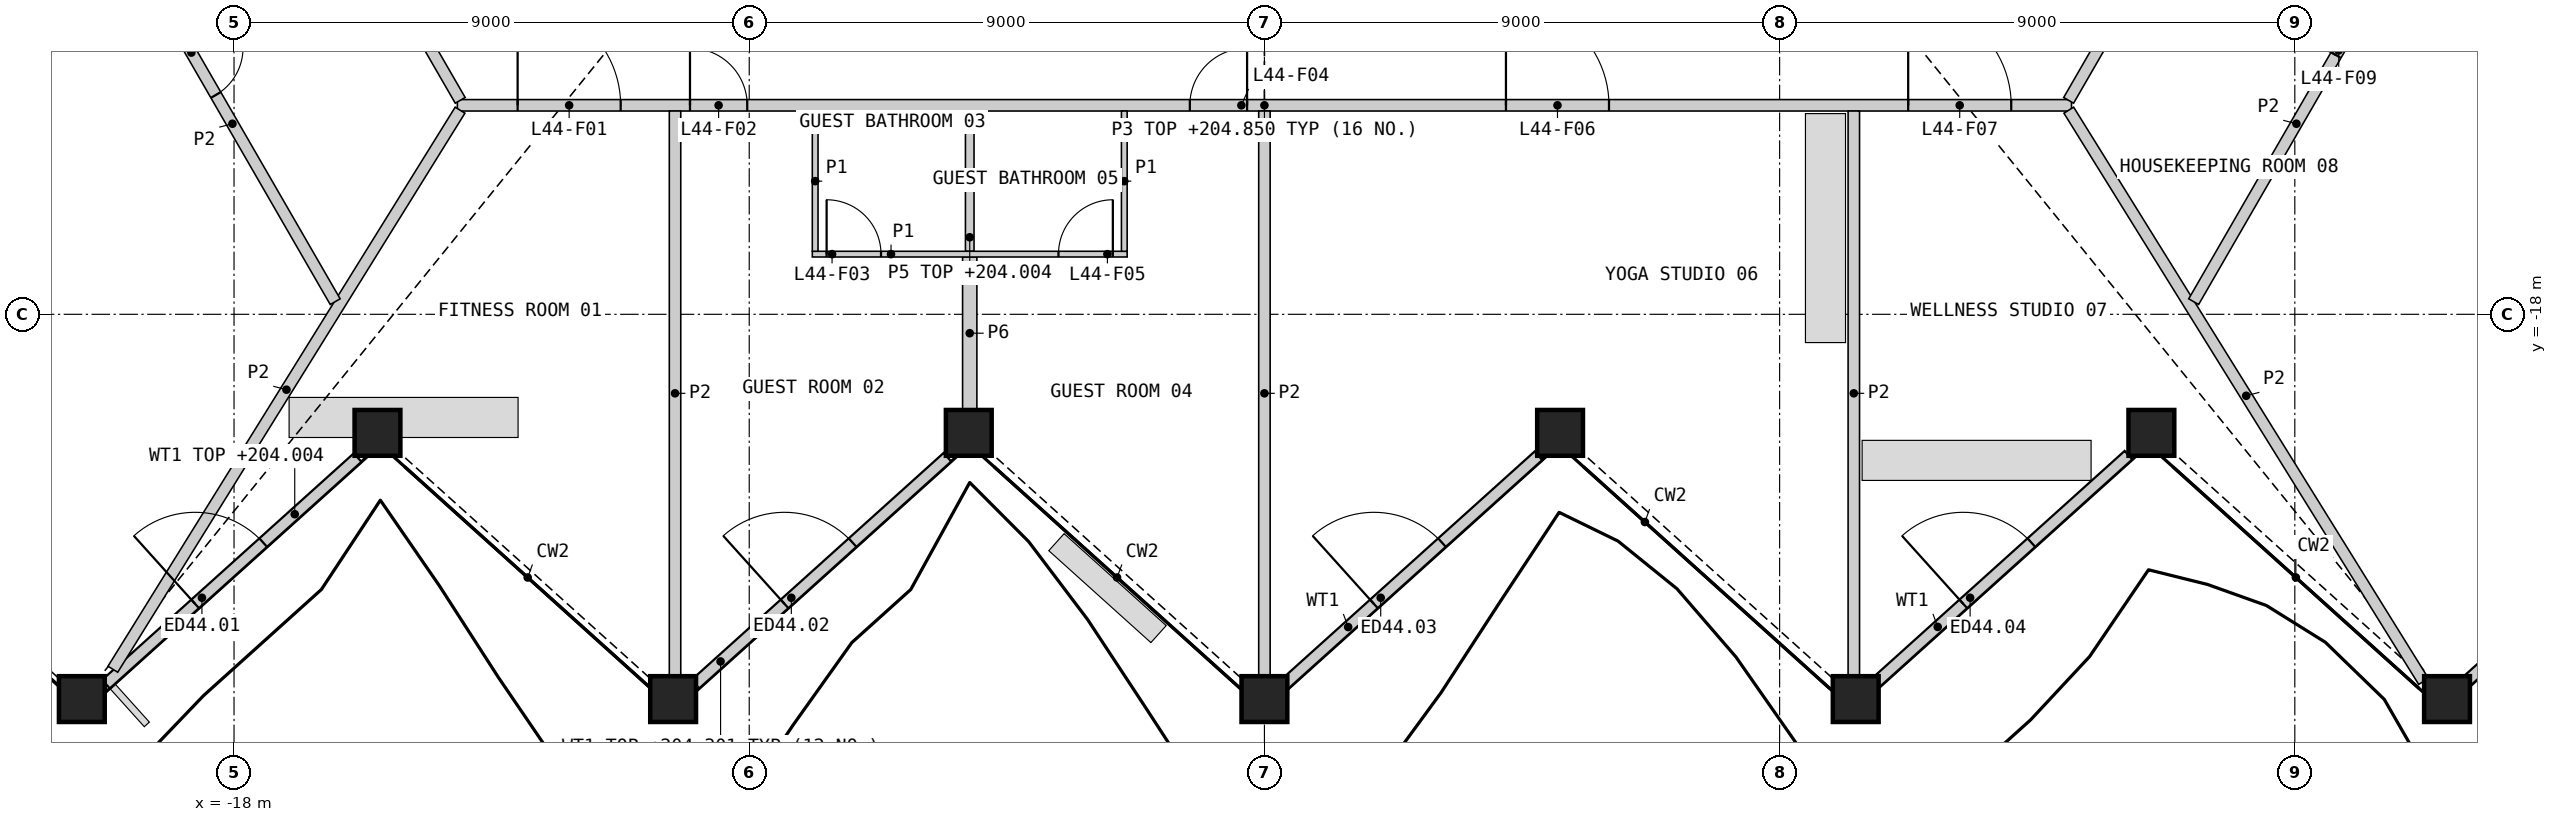
"""IFC4 building model, lengths in metres.
Left out: names, types, materials, properties, quantities, classifications, styles, units other than length and angle.
Written with IfcOpenShell. Run it as: python <this file> out.ifc"""

import sys

from ifc_helpers import new_model, si_unit, direction, frame, frame_2d, origin, origin_2d, place, context, subcontext, project, spatial, rectangle, hollow_rectangle, extrude, element, fill, save


model = new_model("IFC4")
c1 = context("Model", 3, precision=1e-05, world=origin(), true_north=direction((0.0, 1.0)))
c2 = subcontext(c1, "Body", "Model", "MODEL_VIEW")
j1 = project(units=[si_unit("LENGTHUNIT", "METRE"), si_unit("PLANEANGLEUNIT", "RADIAN")], contexts=[c1])
p1 = place(None, origin())
s1 = spatial("IfcSite", under=j1, at=p1, CompositionType="ELEMENT")
p2 = place(p1, origin())
s2 = spatial("IfcBuilding", under=s1, at=p2, CompositionType="ELEMENT")
p3 = place(p2, frame((0.0, 0.0, 201.6)))
s3 = spatial("IfcBuildingStorey", under=s2, at=p3, CompositionType="ELEMENT", Elevation=201.6)
for number, where, z_axis, x_axis in (
    (1, (-20.659, -24.722, 0.0), (0.0, 0.0, 1.0), (1.0, 0.0, 0.0)),
    (2, (-15.494, -20.071, 0.0), (0.0, 0.0, 1.0), (1.0, 0.0, 0.0)),
    (3, (-10.329, -24.722, 0.0), (0.0, 0.0, 1.0), (1.0, 0.0, 0.0)),
    (4, (-5.165, -20.071, 0.0), (0.0, 0.0, 1.0), (1.0, 0.0, 0.0)),
    (5, (0.0, -24.722, 0.0), (0.0, 0.0, 1.0), (1.0, 0.0, 0.0)),
    (6, (5.165, -20.071, 0.0), (0.0, 0.0, 1.0), (1.0, 0.0, 0.0)),
    (7, (10.329, -24.722, 0.0), (0.0, 0.0, 1.0), (1.0, 0.0, 0.0)),
    (8, (15.494, -20.071, 0.0), (0.0, 0.0, 1.0), (1.0, 0.0, 0.0)),
    (9, (20.659, -24.722, 0.0), (0.0, 0.0, 1.0), (1.0, 0.0, 0.0)),
):
    element("IfcColumn", number, at=place(p3, frame(where, z_axis=z_axis, x_axis=x_axis)), inside=s3, PredefinedType="COLUMN", context=c2, shape_type="SweptSolid", body=[
        extrude(hollow_rectangle(XDim=0.8, YDim=0.8, WallThickness=0.05, at=origin_2d()), origin(), (0.0, 0.0, 1.0), 3.6),
    ])
p4 = place(p3, frame((-20.237, -24.461, 0.0), z_axis=(0.0, 0.0, 1.0), x_axis=(0.743136116571, 0.669140278452, 0.0)))
e10 = element("IfcWall", 10, at=p4, inside=s3, PredefinedType="SOLIDWALL", context=c2, shape_type="SweptSolid", body=[
    extrude(rectangle(XDim=5.916, YDim=0.2, at=frame_2d((2.958, 0.0))), origin(), (0.0, 0.0, 1.0), 2.404),
])
p5 = place(p4, frame((2.096, 0.0, 0.0)))
e11 = element("IfcOpeningElement", 11, at=p5, cuts=e10, PredefinedType="OPENING", context=c2, shape_type="SweptSolid", body=[
    extrude(rectangle(XDim=1.6, YDim=2.4, at=frame_2d((0.8, 1.2))), frame((0.0, 0.11, 0.0), z_axis=(0.0, -1.0, 0.0), x_axis=(1.0, 0.0, 0.0)), (0.0, 0.0, 1.0), 0.22),
])
p6 = place(p3, frame((-9.941, -24.461, 0.0), z_axis=(0.0, 0.0, 1.0), x_axis=(0.743160949979, 0.669112697852, 0.0)))
e12 = element("IfcWall", 12, at=p6, inside=s3, PredefinedType="SOLIDWALL", context=c2, shape_type="SweptSolid", body=[
    extrude(rectangle(XDim=5.925, YDim=0.2, at=frame_2d((2.962, 0.0))), origin(), (0.0, 0.0, 1.0), 2.701),
])
p7 = place(p6, frame((2.096, 0.0, 0.0)))
e13 = element("IfcOpeningElement", 13, at=p7, cuts=e12, PredefinedType="OPENING", context=c2, shape_type="SweptSolid", body=[
    extrude(rectangle(XDim=1.6, YDim=2.4, at=frame_2d((0.8, 1.2))), frame((0.0, 0.11, 0.0), z_axis=(0.0, -1.0, 0.0), x_axis=(1.0, 0.0, 0.0)), (0.0, 0.0, 1.0), 0.22),
])
p8 = place(p3, frame((0.355, -24.461, 0.0), z_axis=(0.0, 0.0, 1.0), x_axis=(0.743133280699, 0.669143427912, 0.0)))
e14 = element("IfcWall", 14, at=p8, inside=s3, PredefinedType="SOLIDWALL", context=c2, shape_type="SweptSolid", body=[
    extrude(rectangle(XDim=5.962, YDim=0.2, at=frame_2d((2.981, 0.0))), origin(), (0.0, 0.0, 1.0), 2.701),
])
p9 = place(p8, frame((2.096, 0.0, 0.0)))
e15 = element("IfcOpeningElement", 15, at=p9, cuts=e14, PredefinedType="OPENING", context=c2, shape_type="SweptSolid", body=[
    extrude(rectangle(XDim=1.6, YDim=2.4, at=frame_2d((0.8, 1.2))), frame((0.0, 0.11, 0.0), z_axis=(0.0, -1.0, 0.0), x_axis=(1.0, 0.0, 0.0)), (0.0, 0.0, 1.0), 0.22),
])
p10 = place(p3, frame((10.651, -24.461, 0.0), z_axis=(0.0, 0.0, 1.0), x_axis=(0.743135744435, 0.669140691741, 0.0)))
e16 = element("IfcWall", 16, at=p10, inside=s3, PredefinedType="SOLIDWALL", context=c2, shape_type="SweptSolid", body=[
    extrude(rectangle(XDim=5.979, YDim=0.2, at=frame_2d((2.989, 0.0))), origin(), (0.0, 0.0, 1.0), 2.701),
])
p11 = place(p10, frame((2.096, 0.0, 0.0)))
e17 = element("IfcOpeningElement", 17, at=p11, cuts=e16, PredefinedType="OPENING", context=c2, shape_type="SweptSolid", body=[
    extrude(rectangle(XDim=1.6, YDim=2.4, at=frame_2d((0.8, 1.2))), frame((0.0, 0.11, 0.0), z_axis=(0.0, -1.0, 0.0), x_axis=(1.0, 0.0, 0.0)), (0.0, 0.0, 1.0), 0.22),
])
p12 = place(p3, frame((20.947, -24.461, 0.0), z_axis=(0.0, 0.0, 1.0), x_axis=(0.743162770969, 0.669110675333, 0.0)))
e18 = element("IfcWall", 18, at=p12, inside=s3, PredefinedType="SOLIDWALL", context=c2, shape_type="SweptSolid", body=[
    extrude(rectangle(XDim=6.007, YDim=0.2, at=frame_2d((3.003, 0.0))), origin(), (0.0, 0.0, 1.0), 2.701),
])
p13 = place(p12, frame((2.096, 0.0, 0.0)))
e19 = element("IfcOpeningElement", 19, at=p13, cuts=e18, PredefinedType="OPENING", context=c2, shape_type="SweptSolid", body=[
    extrude(rectangle(XDim=1.6, YDim=2.4, at=frame_2d((0.8, 1.2))), frame((0.0, 0.11, 0.0), z_axis=(0.0, -1.0, 0.0), x_axis=(1.0, 0.0, 0.0)), (0.0, 0.0, 1.0), 0.22),
])
p14 = place(p3, frame((-14.099, -14.349, 0.0), z_axis=(0.0, 0.0, 1.0), x_axis=(1.0, 0.0, 0.0)))
e20 = element("IfcWall", 20, at=p14, inside=s3, PredefinedType="PARTITIONING", context=c2, shape_type="SweptSolid", body=[
    extrude(rectangle(XDim=28.198, YDim=0.2, at=frame_2d((14.099, 0.0))), origin(), (0.0, 0.0, 1.0), 3.25),
])
p15 = place(p14, frame((1.053, 0.0, 0.0)))
e21 = element("IfcOpeningElement", 21, at=p15, cuts=e20, PredefinedType="OPENING", context=c2, shape_type="SweptSolid", body=[
    extrude(rectangle(XDim=1.8, YDim=2.1, at=frame_2d((0.9, 1.05))), frame((0.0, 0.11, 0.0), z_axis=(0.0, -1.0, 0.0), x_axis=(1.0, 0.0, 0.0)), (0.0, 0.0, 1.0), 0.22),
])
p16 = place(p14, frame((4.064, 0.0, 0.0)))
e22 = element("IfcOpeningElement", 22, at=p16, cuts=e20, PredefinedType="OPENING", context=c2, shape_type="SweptSolid", body=[
    extrude(rectangle(XDim=1.0, YDim=2.1, at=frame_2d((0.5, 1.05))), frame((0.0, 0.11, 0.0), z_axis=(0.0, -1.0, 0.0), x_axis=(1.0, 0.0, 0.0)), (0.0, 0.0, 1.0), 0.22),
])
p17 = place(p14, frame((12.796, 0.0, 0.0)))
e23 = element("IfcOpeningElement", 23, at=p17, cuts=e20, PredefinedType="OPENING", context=c2, shape_type="SweptSolid", body=[
    extrude(rectangle(XDim=1.0, YDim=2.1, at=frame_2d((0.5, 1.05))), frame((0.0, 0.11, 0.0), z_axis=(0.0, -1.0, 0.0), x_axis=(1.0, 0.0, 0.0)), (0.0, 0.0, 1.0), 0.22),
])
p18 = place(p14, frame((18.318, 0.0, 0.0)))
e24 = element("IfcOpeningElement", 24, at=p18, cuts=e20, PredefinedType="OPENING", context=c2, shape_type="SweptSolid", body=[
    extrude(rectangle(XDim=1.8, YDim=2.1, at=frame_2d((0.9, 1.05))), frame((0.0, 0.11, 0.0), z_axis=(0.0, -1.0, 0.0), x_axis=(1.0, 0.0, 0.0)), (0.0, 0.0, 1.0), 0.22),
])
p19 = place(p14, frame((25.345, 0.0, 0.0)))
e25 = element("IfcOpeningElement", 25, at=p19, cuts=e20, PredefinedType="OPENING", context=c2, shape_type="SweptSolid", body=[
    extrude(rectangle(XDim=1.8, YDim=2.1, at=frame_2d((0.9, 1.05))), frame((0.0, 0.11, 0.0), z_axis=(0.0, -1.0, 0.0), x_axis=(1.0, 0.0, 0.0)), (0.0, 0.0, 1.0), 0.22),
])
for number, where, z_axis, x_axis in (
    (26, (14.049, -14.262, 0.0), (0.0, 0.0, 1.0), (0.5, 0.866, 0.0)),
    (27, (-15.55, -11.662, 0.0), (0.0, 0.0, 1.0), (0.5, -0.866, 0.0)),
):
    element("IfcWall", number, at=place(p3, frame(where, z_axis=z_axis, x_axis=x_axis)), inside=s3, PredefinedType="PARTITIONING", context=c2, shape_type="SweptSolid", body=[
        extrude(rectangle(XDim=3.002, YDim=0.2, at=frame_2d((1.501, 0.0))), origin(), (0.0, 0.0, 1.0), 3.25),
    ])
p20 = place(p3, frame((-5.148, -19.661, 0.0), z_axis=(0.0, 0.0, 1.0), x_axis=(0.0, 1.0, 0.0)))
e28 = element("IfcWall", 28, at=p20, inside=s3, PredefinedType="PARTITIONING", context=c2, shape_type="SweptSolid", body=[
    extrude(rectangle(XDim=2.663, YDim=0.25, at=frame_2d((1.331, 0.0))), origin(), (0.0, 0.0, 1.0), 2.404),
])
p21 = place(p3, frame((14.052, -14.434, 0.0), z_axis=(0.0, 0.0, 1.0), x_axis=(0.527581174538, -0.849504622868, 0.0)))
e29 = element("IfcWall", 29, at=p21, inside=s3, PredefinedType="PARTITIONING", context=c2, shape_type="SweptSolid", body=[
    extrude(rectangle(XDim=11.747, YDim=0.2, at=frame_2d((5.873, 0.0))), origin(), (0.0, 0.0, 1.0), 2.404),
])
p22 = place(p3, frame((-20.117, -24.2, 0.0), z_axis=(0.0, 0.0, 1.0), x_axis=(0.527576403825, 0.849507585679, 0.0)))
e30 = element("IfcWall", 30, at=p22, inside=s3, PredefinedType="PARTITIONING", context=c2, shape_type="SweptSolid", body=[
    extrude(rectangle(XDim=11.497, YDim=0.2, at=frame_2d((5.749, 0.0))), origin(), (0.0, 0.0, 1.0), 2.404),
])
for number, where, z_axis, x_axis in (
    (31, (-10.296, -24.312, 0.0), (0.0, 0.0, 1.0), (0.0, 1.0, 0.0)),
    (32, (0.0, -24.312, 0.0), (0.0, 0.0, 1.0), (0.0, 1.0, 0.0)),
    (33, (10.296, -24.312, 0.0), (0.0, 0.0, 1.0), (0.0, 1.0, 0.0)),
):
    element("IfcWall", number, at=place(p3, frame(where, z_axis=z_axis, x_axis=x_axis)), inside=s3, PredefinedType="PARTITIONING", context=c2, shape_type="SweptSolid", body=[
        extrude(rectangle(XDim=9.863, YDim=0.2, at=frame_2d((4.931, 0.0))), origin(), (0.0, 0.0, 1.0), 2.404),
    ])
p23 = place(p3, frame((-19.822, -11.562, 0.0), z_axis=(0.0, 0.0, 1.0), x_axis=(0.500008997517, -0.866020209003, 0.0)))
e34 = element("IfcWall", 34, at=p23, inside=s3, PredefinedType="PARTITIONING", context=c2, shape_type="SweptSolid", body=[
    extrude(rectangle(XDim=7.178, YDim=0.2, at=frame_2d((3.589, 0.0))), origin(), (0.0, 0.0, 1.0), 2.404),
])
p24 = place(p23, frame((2.059, 0.0, 0.0)))
e35 = element("IfcOpeningElement", 35, at=p24, cuts=e34, PredefinedType="OPENING", context=c2, shape_type="SweptSolid", body=[
    extrude(rectangle(XDim=0.95, YDim=2.1, at=frame_2d((0.475, 1.05))), frame((0.0, 0.11, 0.0), z_axis=(0.0, -1.0, 0.0), x_axis=(1.0, 0.0, 0.0)), (0.0, 0.0, 1.0), 0.22),
])
p25 = place(p3, frame((16.233, -17.779, 0.0), z_axis=(0.0, 0.0, 1.0), x_axis=(0.500008997517, 0.866020209003, 0.0)))
e36 = element("IfcWall", 36, at=p25, inside=s3, PredefinedType="PARTITIONING", context=c2, shape_type="SweptSolid", body=[
    extrude(rectangle(XDim=7.178, YDim=0.2, at=frame_2d((3.589, 0.0))), origin(), (0.0, 0.0, 1.0), 2.404),
])
p26 = place(p25, frame((4.973, 0.0, 0.0)))
e37 = element("IfcOpeningElement", 37, at=p26, cuts=e36, PredefinedType="OPENING", context=c2, shape_type="SweptSolid", body=[
    extrude(rectangle(XDim=0.95, YDim=2.1, at=frame_2d((0.475, 1.05))), frame((0.0, 0.11, 0.0), z_axis=(0.0, -1.0, 0.0), x_axis=(1.0, 0.0, 0.0)), (0.0, 0.0, 1.0), 0.22),
])
p27 = place(p3, frame((-5.148, -16.899, 0.0), z_axis=(0.0, 0.0, 1.0), x_axis=(0.0, 1.0, 0.0)))
e38 = element("IfcWall", 38, at=p27, inside=s3, PredefinedType="PLUMBINGWALL", context=c2, shape_type="SweptSolid", body=[
    extrude(rectangle(XDim=2.45, YDim=0.15, at=frame_2d((1.225, 0.0))), origin(), (0.0, 0.0, 1.0), 2.404),
])
p28 = place(p3, frame((-7.898, -16.949, 0.0), z_axis=(0.0, 0.0, 1.0), x_axis=(1.0, 0.0, 0.0)))
e39 = element("IfcWall", 39, at=p28, inside=s3, PredefinedType="PARTITIONING", context=c2, shape_type="SweptSolid", body=[
    extrude(rectangle(XDim=5.5, YDim=0.1, at=frame_2d((2.75, 0.0))), origin(), (0.0, 0.0, 1.0), 2.404),
])
p29 = place(p28, frame((0.25, 0.0, 0.0)))
e40 = element("IfcOpeningElement", 40, at=p29, cuts=e39, PredefinedType="OPENING", context=c2, shape_type="SweptSolid", body=[
    extrude(rectangle(XDim=0.95, YDim=2.1, at=frame_2d((0.475, 1.05))), frame((0.0, 0.06, 0.0), z_axis=(0.0, -1.0, 0.0), x_axis=(1.0, 0.0, 0.0)), (0.0, 0.0, 1.0), 0.12),
])
p30 = place(p28, frame((4.3, 0.0, 0.0)))
e41 = element("IfcOpeningElement", 41, at=p30, cuts=e39, PredefinedType="OPENING", context=c2, shape_type="SweptSolid", body=[
    extrude(rectangle(XDim=0.95, YDim=2.1, at=frame_2d((0.475, 1.05))), frame((0.0, 0.06, 0.0), z_axis=(0.0, -1.0, 0.0), x_axis=(1.0, 0.0, 0.0)), (0.0, 0.0, 1.0), 0.12),
])
for number, where, z_axis, x_axis in (
    (42, (-7.848, -16.899, 0.0), (0.0, 0.0, 1.0), (0.0, 1.0, 0.0)),
    (43, (-2.448, -16.899, 0.0), (0.0, 0.0, 1.0), (0.0, 1.0, 0.0)),
):
    element("IfcWall", number, at=place(p3, frame(where, z_axis=z_axis, x_axis=x_axis)), inside=s3, PredefinedType="PARTITIONING", context=c2, shape_type="SweptSolid", body=[
        extrude(rectangle(XDim=2.45, YDim=0.1, at=frame_2d((1.225, 0.0))), origin(), (0.0, 0.0, 1.0), 2.404),
    ])
p31 = place(p5, origin())
e44 = element("IfcDoor", 44, at=p31, inside=s3, OperationType="DOUBLE_DOOR_SINGLE_SWING", PredefinedType="DOOR", context=c2, shape_type="SweptSolid", body=[
    extrude(rectangle(XDim=1.6, YDim=2.4, at=frame_2d((0.8, 1.2))), frame((0.0, 0.025, 0.0), z_axis=(0.0, -1.0, 0.0), x_axis=(1.0, 0.0, 0.0)), (0.0, 0.0, 1.0), 0.05),
])
fill(e11, e44)
p32 = place(p7, origin())
e45 = element("IfcDoor", 45, at=p32, inside=s3, OperationType="DOUBLE_DOOR_SINGLE_SWING", PredefinedType="DOOR", context=c2, shape_type="SweptSolid", body=[
    extrude(rectangle(XDim=1.6, YDim=2.4, at=frame_2d((0.8, 1.2))), frame((0.0, 0.025, 0.0), z_axis=(0.0, -1.0, 0.0), x_axis=(1.0, 0.0, 0.0)), (0.0, 0.0, 1.0), 0.05),
])
fill(e13, e45)
p33 = place(p9, origin())
e46 = element("IfcDoor", 46, at=p33, inside=s3, OperationType="DOUBLE_DOOR_SINGLE_SWING", PredefinedType="DOOR", context=c2, shape_type="SweptSolid", body=[
    extrude(rectangle(XDim=1.6, YDim=2.4, at=frame_2d((0.8, 1.2))), frame((0.0, 0.025, 0.0), z_axis=(0.0, -1.0, 0.0), x_axis=(1.0, 0.0, 0.0)), (0.0, 0.0, 1.0), 0.05),
])
fill(e15, e46)
p34 = place(p11, origin())
e47 = element("IfcDoor", 47, at=p34, inside=s3, OperationType="DOUBLE_DOOR_SINGLE_SWING", PredefinedType="DOOR", context=c2, shape_type="SweptSolid", body=[
    extrude(rectangle(XDim=1.6, YDim=2.4, at=frame_2d((0.8, 1.2))), frame((0.0, 0.025, 0.0), z_axis=(0.0, -1.0, 0.0), x_axis=(1.0, 0.0, 0.0)), (0.0, 0.0, 1.0), 0.05),
])
fill(e17, e47)
p35 = place(p15, origin())
e48 = element("IfcDoor", 48, at=p35, inside=s3, OperationType="DOUBLE_DOOR_SINGLE_SWING", PredefinedType="DOOR", context=c2, shape_type="SweptSolid", body=[
    extrude(rectangle(XDim=1.8, YDim=2.1, at=frame_2d((0.9, 1.05))), frame((0.0, 0.025, 0.0), z_axis=(0.0, -1.0, 0.0), x_axis=(1.0, 0.0, 0.0)), (0.0, 0.0, 1.0), 0.05),
])
fill(e21, e48)
p36 = place(p16, origin())
e49 = element("IfcDoor", 49, at=p36, inside=s3, OperationType="SINGLE_SWING_LEFT", PredefinedType="DOOR", context=c2, shape_type="SweptSolid", body=[
    extrude(rectangle(XDim=1.0, YDim=2.1, at=frame_2d((0.5, 1.05))), frame((0.0, 0.025, 0.0), z_axis=(0.0, -1.0, 0.0), x_axis=(1.0, 0.0, 0.0)), (0.0, 0.0, 1.0), 0.05),
])
fill(e22, e49)
p37 = place(p29, origin())
e50 = element("IfcDoor", 50, at=p37, inside=s3, OperationType="SINGLE_SWING_LEFT", PredefinedType="DOOR", context=c2, shape_type="SweptSolid", body=[
    extrude(rectangle(XDim=0.95, YDim=2.1, at=frame_2d((0.475, 1.05))), frame((0.0, 0.025, 0.0), z_axis=(0.0, -1.0, 0.0), x_axis=(1.0, 0.0, 0.0)), (0.0, 0.0, 1.0), 0.05),
])
fill(e40, e50)
p38 = place(p17, origin())
e51 = element("IfcDoor", 51, at=p38, inside=s3, OperationType="SINGLE_SWING_RIGHT", PredefinedType="DOOR", context=c2, shape_type="SweptSolid", body=[
    extrude(rectangle(XDim=1.0, YDim=2.1, at=frame_2d((0.5, 1.05))), frame((0.0, 0.025, 0.0), z_axis=(0.0, -1.0, 0.0), x_axis=(1.0, 0.0, 0.0)), (0.0, 0.0, 1.0), 0.05),
])
fill(e23, e51)
p39 = place(p30, origin())
e52 = element("IfcDoor", 52, at=p39, inside=s3, OperationType="SINGLE_SWING_RIGHT", PredefinedType="DOOR", context=c2, shape_type="SweptSolid", body=[
    extrude(rectangle(XDim=0.95, YDim=2.1, at=frame_2d((0.475, 1.05))), frame((0.0, 0.025, 0.0), z_axis=(0.0, -1.0, 0.0), x_axis=(1.0, 0.0, 0.0)), (0.0, 0.0, 1.0), 0.05),
])
fill(e41, e52)
p40 = place(p18, origin())
e53 = element("IfcDoor", 53, at=p40, inside=s3, OperationType="DOUBLE_DOOR_SINGLE_SWING", PredefinedType="DOOR", context=c2, shape_type="SweptSolid", body=[
    extrude(rectangle(XDim=1.8, YDim=2.1, at=frame_2d((0.9, 1.05))), frame((0.0, 0.025, 0.0), z_axis=(0.0, -1.0, 0.0), x_axis=(1.0, 0.0, 0.0)), (0.0, 0.0, 1.0), 0.05),
])
fill(e24, e53)
p41 = place(p19, origin())
e54 = element("IfcDoor", 54, at=p41, inside=s3, OperationType="DOUBLE_DOOR_SINGLE_SWING", PredefinedType="DOOR", context=c2, shape_type="SweptSolid", body=[
    extrude(rectangle(XDim=1.8, YDim=2.1, at=frame_2d((0.9, 1.05))), frame((0.0, 0.025, 0.0), z_axis=(0.0, -1.0, 0.0), x_axis=(1.0, 0.0, 0.0)), (0.0, 0.0, 1.0), 0.05),
])
fill(e25, e54)
p42 = place(p26, origin())
e55 = element("IfcDoor", 55, at=p42, inside=s3, OperationType="SINGLE_SWING_LEFT", PredefinedType="DOOR", context=c2, shape_type="SweptSolid", body=[
    extrude(rectangle(XDim=0.95, YDim=2.1, at=frame_2d((0.475, 1.05))), frame((0.0, 0.025, 0.0), z_axis=(0.0, -1.0, 0.0), x_axis=(1.0, 0.0, 0.0)), (0.0, 0.0, 1.0), 0.05),
])
fill(e37, e55)
p43 = place(p24, origin())
e56 = element("IfcDoor", 56, at=p43, inside=s3, OperationType="SINGLE_SWING_LEFT", PredefinedType="DOOR", context=c2, shape_type="SweptSolid", body=[
    extrude(rectangle(XDim=0.95, YDim=2.1, at=frame_2d((0.475, 1.05))), frame((0.0, 0.025, 0.0), z_axis=(0.0, -1.0, 0.0), x_axis=(1.0, 0.0, 0.0)), (0.0, 0.0, 1.0), 0.05),
])
fill(e35, e56)
save(model, sys.argv[1])
